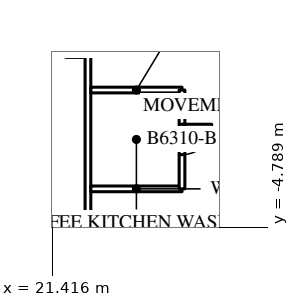
"""IFC4 building model, lengths in metres.
Left out: names, types, materials, properties, quantities, classifications, styles, units other than length and angle.
Written with IfcOpenShell. Run it as: python <this file> out.ifc"""

import sys

from ifc_helpers import new_model, si_unit, direction, frame, frame_2d, origin, origin_2d, place, context, subcontext, project, spatial, rectangle, i_section, extrude, element, fill, save


model = new_model("IFC4")
c1 = context("Model", 3, precision=1e-05, world=origin(), true_north=direction((0.0, 1.0)))
c2 = subcontext(c1, "Body", "Model", "MODEL_VIEW")
j1 = project(units=[si_unit("LENGTHUNIT", "METRE"), si_unit("PLANEANGLEUNIT", "RADIAN")], contexts=[c1])
p1 = place(None, origin())
s1 = spatial("IfcSite", under=j1, at=p1, CompositionType="ELEMENT")
p2 = place(p1, origin())
s2 = spatial("IfcBuilding", under=s1, at=p2, CompositionType="ELEMENT")
p3 = place(p2, frame((0.0, 0.0, 236.9)))
s3 = spatial("IfcBuildingStorey", under=s2, at=p3, CompositionType="ELEMENT", Elevation=236.9)
p4 = place(p3, frame((22.0, 0.0, 0.0), z_axis=(0.0, 0.0, 1.0), x_axis=(1.0, 0.0, 0.0)))
e1 = element("IfcColumn", 1, at=p4, inside=s3, PredefinedType="COLUMN", context=c2, shape_type="SweptSolid", body=[
    extrude(i_section(OverallWidth=0.448, OverallDepth=0.55, WebThickness=0.072, FlangeThickness=0.115, FilletRadius=0.02, at=origin_2d()), origin(), (0.0, 0.0, 1.0), 3.6),
])
p5 = place(p3, frame((22.35, -12.07, 0.0), z_axis=(0.0, 0.0, 1.0), x_axis=(0.0, 1.0, 0.0)))
e2 = element("IfcWall", 2, at=p5, inside=s3, PredefinedType="PARTITIONING", context=c2, shape_type="SweptSolid", body=[
    extrude(rectangle(XDim=12.37, YDim=0.15, at=frame_2d((6.185, 0.0))), origin(), (0.0, 0.0, 1.0), 3.4),
])
for number, where, z_axis, x_axis in (
    (3, (22.425, -3.775, 0.0), (0.0, 0.0, 1.0), (1.0, 0.0, 0.0)),
    (4, (22.425, -1.175, 0.0), (0.0, 0.0, 1.0), (1.0, 0.0, 0.0)),
):
    element("IfcWall", number, at=place(p3, frame(where, z_axis=z_axis, x_axis=x_axis)), inside=s3, PredefinedType="PARTITIONING", context=c2, shape_type="SweptSolid", body=[
        extrude(rectangle(XDim=2.4, YDim=0.15, at=frame_2d((1.2, 0.0))), origin(), (0.0, 0.0, 1.0), 3.4),
    ])
p6 = place(p3, frame((24.825, -3.775, 0.0), z_axis=(0.0, 0.0, 1.0), x_axis=(0.0, 1.0, 0.0)))
e5 = element("IfcWall", 5, at=p6, inside=s3, PredefinedType="PARTITIONING", context=c2, shape_type="SweptSolid", body=[
    extrude(rectangle(XDim=2.6, YDim=0.15, at=frame_2d((1.3, 0.0))), origin(), (0.0, 0.0, 1.0), 3.4),
])
p7 = place(p6, frame((0.9, 0.0, 0.0)))
e6 = element("IfcOpeningElement", 6, at=p7, cuts=e5, PredefinedType="OPENING", context=c2, shape_type="SweptSolid", body=[
    extrude(rectangle(XDim=0.8, YDim=2.2, at=frame_2d((0.4, 1.1))), frame((0.0, 0.085, 0.0), z_axis=(0.0, -1.0, 0.0), x_axis=(1.0, 0.0, 0.0)), (0.0, 0.0, 1.0), 0.17),
])
p8 = place(p7, origin())
e7 = element("IfcDoor", 7, at=p8, inside=s3, OperationType="SINGLE_SWING_RIGHT", PredefinedType="DOOR", context=c2, shape_type="SweptSolid", body=[
    extrude(rectangle(XDim=0.8, YDim=2.2, at=frame_2d((0.4, 1.1))), frame((0.0, 0.025, 0.0), z_axis=(0.0, -1.0, 0.0), x_axis=(1.0, 0.0, 0.0)), (0.0, 0.0, 1.0), 0.05),
])
fill(e6, e7)
save(model, sys.argv[1])
